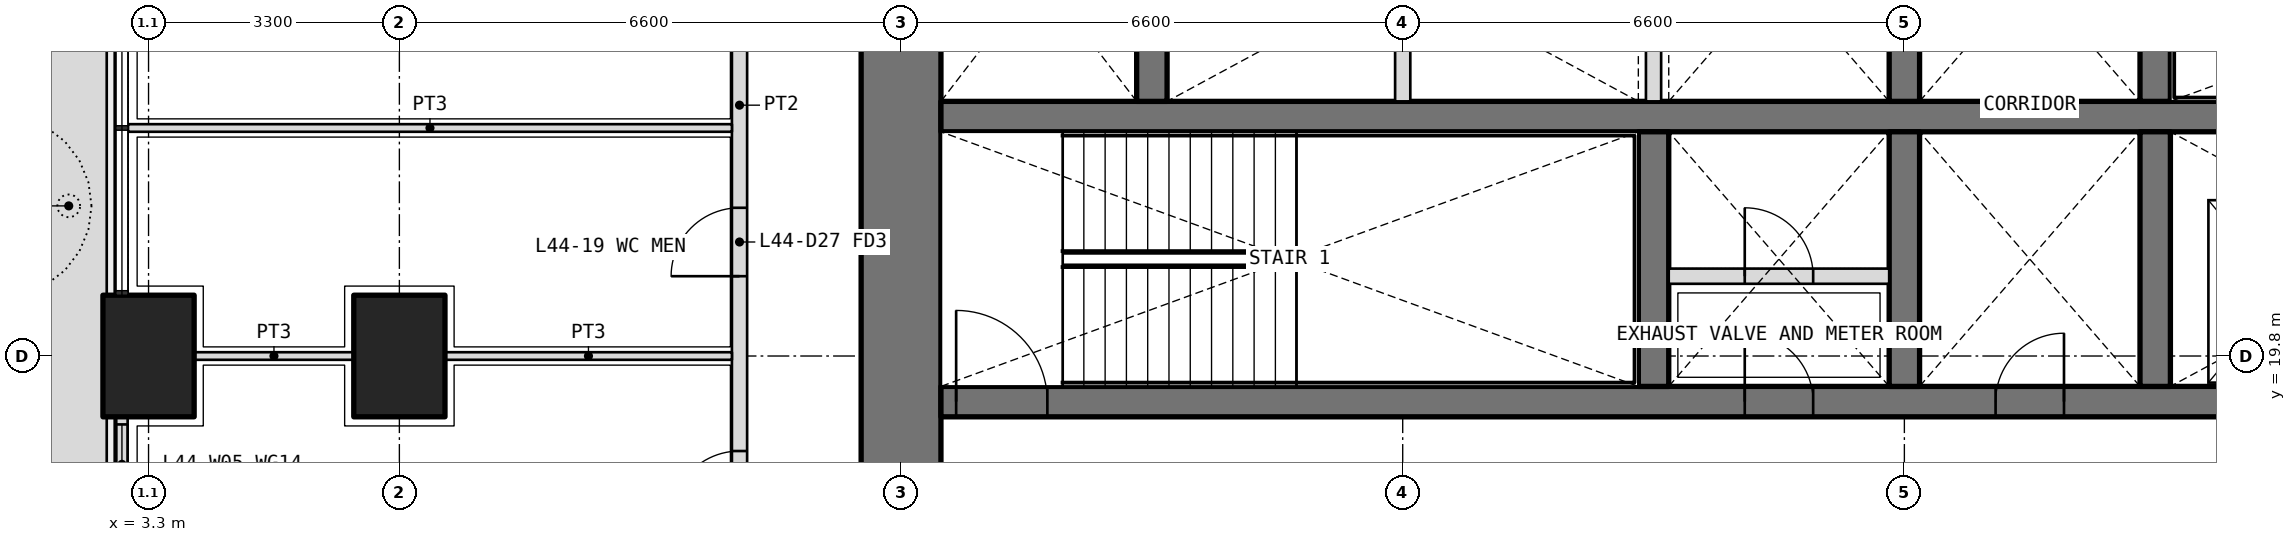
"""IFC4 building model, lengths in metres.
Left out: names, types, materials, properties, quantities, classifications, styles, units other than length and angle.
Written with IfcOpenShell. Run it as: python <this file> out.ifc"""

import sys

from ifc_helpers import new_model, si_unit, direction, frame, frame_2d, origin, origin_2d, place, context, subcontext, project, spatial, polyline, rectangle, outline, extrude, element, fill, save


model = new_model("IFC4")
c1 = context("Model", 3, precision=1e-05, world=origin(), true_north=direction((0.0, 1.0)))
c2 = subcontext(c1, "Body", "Model", "MODEL_VIEW")
j1 = project(units=[si_unit("LENGTHUNIT", "METRE"), si_unit("PLANEANGLEUNIT", "RADIAN")], contexts=[c1])
p1 = place(None, origin())
s1 = spatial("IfcSite", under=j1, at=p1, CompositionType="ELEMENT")
p2 = place(p1, origin())
s2 = spatial("IfcBuilding", under=s1, at=p2, CompositionType="ELEMENT")
p3 = place(p2, frame((0.0, 0.0, 193.5)))
s3 = spatial("IfcBuildingStorey", under=s2, at=p3, CompositionType="ELEMENT", Elevation=193.5)
for number, where, z_axis, x_axis in (
    (1, (3.3, 19.8, 0.0), (0.0, 0.0, 1.0), (0.0, 1.0, 0.0)),
    (2, (6.6, 19.8, 0.0), (0.0, 0.0, 1.0), (0.0, 1.0, 0.0)),
):
    element("IfcColumn", number, at=place(p3, frame(where, z_axis=z_axis, x_axis=x_axis)), inside=s3, PredefinedType="COLUMN", context=c2, shape_type="SweptSolid", body=[
        extrude(rectangle(XDim=1.6, YDim=1.2, at=origin_2d()), origin(), (0.0, 0.0, 1.0), 4.2),
    ])
p4 = place(p3, origin())
e3 = element("IfcWall", 3, at=p4, inside=s3, PredefinedType="USERDEFINED", context=c2, shape_type="SweptSolid", body=[
    extrude(outline(polyline([(1.75, 17.25), (2.75, 17.25), (2.75, 26.3), (1.75, 26.3), (1.75, 17.25)]), holes=[polyline([(1.9, 17.4), (2.6, 17.4), (2.6, 26.15), (1.9, 26.15), (1.9, 17.4)])]), origin(), (0.0, 0.0, 1.0), 1.05),
])
p5 = place(p3, frame((2.95, 19.0, 0.0), z_axis=(0.0, 0.0, 1.0), x_axis=(0.0, -1.0, 0.0)))
e4 = element("IfcWall", 4, at=p5, inside=s3, PredefinedType="SOLIDWALL", context=c2, shape_type="SweptSolid", body=[
    extrude(rectangle(XDim=5.0, YDim=0.15, at=frame_2d((2.5, 0.0))), origin(), (0.0, 0.0, 1.0), 2.7),
])
p6 = place(p5, frame((1.25, 0.0, 0.0)))
e5 = element("IfcOpeningElement", 5, at=p6, cuts=e4, PredefinedType="OPENING", context=c2, shape_type="SweptSolid", body=[
    extrude(rectangle(XDim=1.0, YDim=2.4, at=frame_2d((0.5, 1.2))), frame((0.0, 0.085, 0.0), z_axis=(0.0, -1.0, 0.0), x_axis=(1.0, 0.0, 0.0)), (0.0, 0.0, 1.0), 0.17),
])
p7 = place(p5, frame((0.1, 0.0, 0.1)))
e6 = element("IfcOpeningElement", 6, at=p7, cuts=e4, PredefinedType="OPENING", context=c2, shape_type="SweptSolid", body=[
    extrude(rectangle(XDim=1.05, YDim=2.3, at=frame_2d((0.525, 1.15))), frame((0.0, 0.085, 0.0), z_axis=(0.0, -1.0, 0.0), x_axis=(1.0, 0.0, 0.0)), (0.0, 0.0, 1.0), 0.17),
])
p8 = place(p5, frame((2.75, 0.0, 0.1)))
e7 = element("IfcOpeningElement", 7, at=p8, cuts=e4, PredefinedType="OPENING", context=c2, shape_type="SweptSolid", body=[
    extrude(rectangle(XDim=2.15, YDim=2.3, at=frame_2d((1.075, 1.15))), frame((0.0, 0.085, 0.0), z_axis=(0.0, -1.0, 0.0), x_axis=(1.0, 0.0, 0.0)), (0.0, 0.0, 1.0), 0.17),
])
p9 = place(p3, frame((13.2, 32.475, 0.0), z_axis=(0.0, 0.0, 1.0), x_axis=(0.0, -1.0, 0.0)))
e8 = element("IfcWall", 8, at=p9, inside=s3, PredefinedType="SHEAR", context=c2, shape_type="SweptSolid", body=[
    extrude(rectangle(XDim=18.75, YDim=1.05, at=frame_2d((9.375, 0.0))), origin(), (0.0, 0.0, 1.0), 4.2),
])
p10 = place(p9, frame((14.125, 0.0, 0.0)))
e9 = element("IfcOpeningElement", 9, at=p10, cuts=e8, PredefinedType="OPENING", context=c2, shape_type="SweptSolid", body=[
    extrude(rectangle(XDim=1.6, YDim=2.1, at=frame_2d((0.8, 1.05))), frame((0.0, 0.535, 0.0), z_axis=(0.0, -1.0, 0.0), x_axis=(1.0, 0.0, 0.0)), (0.0, 0.0, 1.0), 1.07),
])
p11 = place(p9, frame((3.325, 0.0, 0.0)))
e10 = element("IfcOpeningElement", 10, at=p11, cuts=e8, PredefinedType="OPENING", context=c2, shape_type="SweptSolid", body=[
    extrude(rectangle(XDim=1.6, YDim=2.1, at=frame_2d((0.8, 1.05))), frame((0.0, 0.535, 0.0), z_axis=(0.0, -1.0, 0.0), x_axis=(1.0, 0.0, 0.0)), (0.0, 0.0, 1.0), 1.07),
])
p12 = place(p3, frame((13.725, 19.2, 0.0), z_axis=(0.0, 0.0, 1.0), x_axis=(1.0, 0.0, 0.0)))
e11 = element("IfcWall", 11, at=p12, inside=s3, PredefinedType="SHEAR", context=c2, shape_type="SweptSolid", body=[
    extrude(rectangle(XDim=25.35, YDim=0.4, at=frame_2d((12.675, 0.0))), origin(), (0.0, 0.0, 1.0), 4.2),
])
p13 = place(p12, frame((10.575, 0.0, 0.0)))
e12 = element("IfcOpeningElement", 12, at=p13, cuts=e11, PredefinedType="OPENING", context=c2, shape_type="SweptSolid", body=[
    extrude(rectangle(XDim=0.9, YDim=2.1, at=frame_2d((0.45, 1.05))), frame((0.0, 0.21, 0.0), z_axis=(0.0, -1.0, 0.0), x_axis=(1.0, 0.0, 0.0)), (0.0, 0.0, 1.0), 0.42),
])
p14 = place(p12, frame((13.875, 0.0, 0.0)))
e13 = element("IfcOpeningElement", 13, at=p14, cuts=e11, PredefinedType="OPENING", context=c2, shape_type="SweptSolid", body=[
    extrude(rectangle(XDim=0.9, YDim=2.1, at=frame_2d((0.45, 1.05))), frame((0.0, 0.21, 0.0), z_axis=(0.0, -1.0, 0.0), x_axis=(1.0, 0.0, 0.0)), (0.0, 0.0, 1.0), 0.42),
])
p15 = place(p12, frame((0.2, 0.0, 0.0)))
e14 = element("IfcOpeningElement", 14, at=p15, cuts=e11, PredefinedType="OPENING", context=c2, shape_type="SweptSolid", body=[
    extrude(rectangle(XDim=1.2, YDim=2.1, at=frame_2d((0.6, 1.05))), frame((0.0, 0.21, 0.0), z_axis=(0.0, -1.0, 0.0), x_axis=(1.0, 0.0, 0.0)), (0.0, 0.0, 1.0), 0.42),
])
p16 = place(p12, frame((23.512, 0.0, 0.0)))
e15 = element("IfcOpeningElement", 15, at=p16, cuts=e11, PredefinedType="OPENING", context=c2, shape_type="SweptSolid", body=[
    extrude(rectangle(XDim=1.1, YDim=2.1, at=frame_2d((0.55, 1.05))), frame((0.0, 0.21, 0.0), z_axis=(0.0, -1.0, 0.0), x_axis=(1.0, 0.0, 0.0)), (0.0, 0.0, 1.0), 0.42),
])
p17 = place(p12, frame((17.125, 0.0, 0.0)))
e16 = element("IfcOpeningElement", 16, at=p17, cuts=e11, PredefinedType="OPENING", context=c2, shape_type="SweptSolid", body=[
    extrude(rectangle(XDim=1.1, YDim=2.1, at=frame_2d((0.55, 1.05))), frame((0.0, 0.21, 0.0), z_axis=(0.0, -1.0, 0.0), x_axis=(1.0, 0.0, 0.0)), (0.0, 0.0, 1.0), 0.42),
])
p18 = place(p12, frame((20.325, 0.0, 0.0)))
e17 = element("IfcOpeningElement", 17, at=p18, cuts=e11, PredefinedType="OPENING", context=c2, shape_type="SweptSolid", body=[
    extrude(rectangle(XDim=1.1, YDim=2.1, at=frame_2d((0.55, 1.05))), frame((0.0, 0.21, 0.0), z_axis=(0.0, -1.0, 0.0), x_axis=(1.0, 0.0, 0.0)), (0.0, 0.0, 1.0), 0.42),
])
p19 = place(p3, frame((13.725, 22.95, 0.0), z_axis=(0.0, 0.0, 1.0), x_axis=(1.0, 0.0, 0.0)))
e18 = element("IfcWall", 18, at=p19, inside=s3, PredefinedType="SHEAR", context=c2, shape_type="SweptSolid", body=[
    extrude(rectangle(XDim=25.35, YDim=0.4, at=frame_2d((12.675, 0.0))), origin(), (0.0, 0.0, 1.0), 4.2),
])
for number, where, z_axis, x_axis in (
    (19, (23.1, 19.4, 0.0), (0.0, 0.0, 1.0), (0.0, 1.0, 0.0)),
    (20, (26.4, 19.4, 0.0), (0.0, 0.0, 1.0), (0.0, 1.0, 0.0)),
    (21, (29.7, 19.4, 0.0), (0.0, 0.0, 1.0), (0.0, 1.0, 0.0)),
    (22, (16.5, 23.15, 0.0), (0.0, 0.0, 1.0), (0.0, 1.0, 0.0)),
    (23, (26.4, 23.15, 0.0), (0.0, 0.0, 1.0), (0.0, 1.0, 0.0)),
    (24, (29.7, 23.15, 0.0), (0.0, 0.0, 1.0), (0.0, 1.0, 0.0)),
):
    element("IfcWall", number, at=place(p3, frame(where, z_axis=z_axis, x_axis=x_axis)), inside=s3, PredefinedType="SHEAR", context=c2, shape_type="SweptSolid", body=[
        extrude(rectangle(XDim=3.35, YDim=0.4, at=frame_2d((1.675, 0.0))), origin(), (0.0, 0.0, 1.0), 4.2),
    ])
for number, where, z_axis, x_axis in (
    (25, (19.8, 23.15, 0.0), (0.0, 0.0, 1.0), (0.0, 1.0, 0.0)),
    (26, (23.1, 23.15, 0.0), (0.0, 0.0, 1.0), (0.0, 1.0, 0.0)),
):
    element("IfcWall", number, at=place(p3, frame(where, z_axis=z_axis, x_axis=x_axis)), inside=s3, PredefinedType="PARTITIONING", context=c2, shape_type="SweptSolid", body=[
        extrude(rectangle(XDim=3.35, YDim=0.2, at=frame_2d((1.675, 0.0))), origin(), (0.0, 0.0, 1.0), 4.2),
    ])
p20 = place(p3, frame((11.075, 11.175, 0.0), z_axis=(0.0, 0.0, 1.0), x_axis=(0.0, 1.0, 0.0)))
e27 = element("IfcWall", 27, at=p20, inside=s3, PredefinedType="PARTITIONING", context=c2, shape_type="SweptSolid", body=[
    extrude(rectangle(XDim=23.85, YDim=0.2, at=frame_2d((11.925, 0.0))), origin(), (0.0, 0.0, 1.0), 2.85),
])
p21 = place(p20, frame((0.462, 0.0, 0.0)))
e28 = element("IfcOpeningElement", 28, at=p21, cuts=e27, PredefinedType="OPENING", context=c2, shape_type="SweptSolid", body=[
    extrude(rectangle(XDim=1.0, YDim=2.1, at=frame_2d((0.5, 1.05))), frame((0.0, 0.11, 0.0), z_axis=(0.0, -1.0, 0.0), x_axis=(1.0, 0.0, 0.0)), (0.0, 0.0, 1.0), 0.22),
])
p22 = place(p20, frame((3.125, 0.0, 0.0)))
e29 = element("IfcOpeningElement", 29, at=p22, cuts=e27, PredefinedType="OPENING", context=c2, shape_type="SweptSolid", body=[
    extrude(rectangle(XDim=1.0, YDim=2.1, at=frame_2d((0.5, 1.05))), frame((0.0, 0.11, 0.0), z_axis=(0.0, -1.0, 0.0), x_axis=(1.0, 0.0, 0.0)), (0.0, 0.0, 1.0), 0.22),
])
p23 = place(p20, frame((6.475, 0.0, 0.0)))
e30 = element("IfcOpeningElement", 30, at=p23, cuts=e27, PredefinedType="OPENING", context=c2, shape_type="SweptSolid", body=[
    extrude(rectangle(XDim=0.9, YDim=2.1, at=frame_2d((0.45, 1.05))), frame((0.0, 0.11, 0.0), z_axis=(0.0, -1.0, 0.0), x_axis=(1.0, 0.0, 0.0)), (0.0, 0.0, 1.0), 0.22),
])
p24 = place(p20, frame((9.675, 0.0, 0.0)))
e31 = element("IfcOpeningElement", 31, at=p24, cuts=e27, PredefinedType="OPENING", context=c2, shape_type="SweptSolid", body=[
    extrude(rectangle(XDim=0.9, YDim=2.1, at=frame_2d((0.45, 1.05))), frame((0.0, 0.11, 0.0), z_axis=(0.0, -1.0, 0.0), x_axis=(1.0, 0.0, 0.0)), (0.0, 0.0, 1.0), 0.22),
])
p25 = place(p20, frame((12.925, 0.0, 0.0)))
e32 = element("IfcOpeningElement", 32, at=p25, cuts=e27, PredefinedType="OPENING", context=c2, shape_type="SweptSolid", body=[
    extrude(rectangle(XDim=1.0, YDim=2.1, at=frame_2d((0.5, 1.05))), frame((0.0, 0.11, 0.0), z_axis=(0.0, -1.0, 0.0), x_axis=(1.0, 0.0, 0.0)), (0.0, 0.0, 1.0), 0.22),
])
p26 = place(p20, frame((17.925, 0.0, 0.0)))
e33 = element("IfcOpeningElement", 33, at=p26, cuts=e27, PredefinedType="OPENING", context=c2, shape_type="SweptSolid", body=[
    extrude(rectangle(XDim=1.2, YDim=2.1, at=frame_2d((0.6, 1.05))), frame((0.0, 0.11, 0.0), z_axis=(0.0, -1.0, 0.0), x_axis=(1.0, 0.0, 0.0)), (0.0, 0.0, 1.0), 0.22),
])
p27 = place(p20, frame((22.288, 0.0, 0.0)))
e34 = element("IfcOpeningElement", 34, at=p27, cuts=e27, PredefinedType="OPENING", context=c2, shape_type="SweptSolid", body=[
    extrude(rectangle(XDim=1.2, YDim=2.1, at=frame_2d((0.6, 1.05))), frame((0.0, 0.11, 0.0), z_axis=(0.0, -1.0, 0.0), x_axis=(1.0, 0.0, 0.0)), (0.0, 0.0, 1.0), 0.22),
])
p28 = place(p3, frame((3.9, 19.8, 0.0), z_axis=(0.0, 0.0, 1.0), x_axis=(1.0, 0.0, 0.0)))
e35 = element("IfcWall", 35, at=p28, inside=s3, PredefinedType="PARTITIONING", context=c2, shape_type="SweptSolid", body=[
    extrude(rectangle(XDim=2.1, YDim=0.1, at=frame_2d((1.05, 0.0))), origin(), (0.0, 0.0, 1.0), 2.85),
])
p29 = place(p3, frame((7.2, 19.8, 0.0), z_axis=(0.0, 0.0, 1.0), x_axis=(1.0, 0.0, 0.0)))
e36 = element("IfcWall", 36, at=p29, inside=s3, PredefinedType="PARTITIONING", context=c2, shape_type="SweptSolid", body=[
    extrude(rectangle(XDim=3.775, YDim=0.1, at=frame_2d((1.888, 0.0))), origin(), (0.0, 0.0, 1.0), 2.85),
])
p30 = place(p3, frame((3.03, 22.8, 0.0), z_axis=(0.0, 0.0, 1.0), x_axis=(1.0, 0.0, 0.0)))
e37 = element("IfcWall", 37, at=p30, inside=s3, PredefinedType="PARTITIONING", context=c2, shape_type="SweptSolid", body=[
    extrude(rectangle(XDim=7.945, YDim=0.1, at=frame_2d((3.973, 0.0))), origin(), (0.0, 0.0, 1.0), 2.7),
])
p31 = place(p3, frame((23.3, 20.85, 0.0), z_axis=(0.0, 0.0, 1.0), x_axis=(1.0, 0.0, 0.0)))
e38 = element("IfcWall", 38, at=p31, inside=s3, PredefinedType="PARTITIONING", context=c2, shape_type="SweptSolid", body=[
    extrude(rectangle(XDim=2.9, YDim=0.2, at=frame_2d((1.45, 0.0))), origin(), (0.0, 0.0, 1.0), 3.9),
])
p32 = place(p31, frame((1.0, 0.0, 0.0)))
e39 = element("IfcOpeningElement", 39, at=p32, cuts=e38, PredefinedType="OPENING", context=c2, shape_type="SweptSolid", body=[
    extrude(rectangle(XDim=0.9, YDim=2.1, at=frame_2d((0.45, 1.05))), frame((0.0, 0.11, 0.0), z_axis=(0.0, -1.0, 0.0), x_axis=(1.0, 0.0, 0.0)), (0.0, 0.0, 1.0), 0.22),
])
p33 = place(p7, origin())
e40 = element("IfcWindow", 40, at=p33, inside=s3, PartitioningType="SINGLE_PANEL", PredefinedType="WINDOW", context=c2, shape_type="SweptSolid", body=[
    extrude(rectangle(XDim=1.05, YDim=2.3, at=frame_2d((0.525, 1.15))), frame((0.0, 0.03, 0.0), z_axis=(0.0, -1.0, 0.0), x_axis=(1.0, 0.0, 0.0)), (0.0, 0.0, 1.0), 0.06),
])
fill(e6, e40)
p34 = place(p23, origin())
e41 = element("IfcDoor", 41, at=p34, inside=s3, OperationType="SINGLE_SWING_LEFT", PredefinedType="DOOR", context=c2, shape_type="SweptSolid", body=[
    extrude(rectangle(XDim=0.9, YDim=2.1, at=frame_2d((0.45, 1.05))), frame((0.0, 0.025, 0.0), z_axis=(0.0, -1.0, 0.0), x_axis=(1.0, 0.0, 0.0)), (0.0, 0.0, 1.0), 0.05),
])
fill(e30, e41)
p35 = place(p24, origin())
e42 = element("IfcDoor", 42, at=p35, inside=s3, OperationType="SINGLE_SWING_LEFT", PredefinedType="DOOR", context=c2, shape_type="SweptSolid", body=[
    extrude(rectangle(XDim=0.9, YDim=2.1, at=frame_2d((0.45, 1.05))), frame((0.0, 0.025, 0.0), z_axis=(0.0, -1.0, 0.0), x_axis=(1.0, 0.0, 0.0)), (0.0, 0.0, 1.0), 0.05),
])
fill(e31, e42)
p36 = place(p13, origin())
e43 = element("IfcDoor", 43, at=p36, inside=s3, OperationType="SINGLE_SWING_LEFT", PredefinedType="DOOR", context=c2, shape_type="SweptSolid", body=[
    extrude(rectangle(XDim=0.9, YDim=2.1, at=frame_2d((0.45, 1.05))), frame((0.0, 0.025, 0.0), z_axis=(0.0, -1.0, 0.0), x_axis=(1.0, 0.0, 0.0)), (0.0, 0.0, 1.0), 0.05),
])
fill(e12, e43)
p37 = place(p32, origin())
e44 = element("IfcDoor", 44, at=p37, inside=s3, OperationType="SINGLE_SWING_LEFT", PredefinedType="DOOR", context=c2, shape_type="SweptSolid", body=[
    extrude(rectangle(XDim=0.9, YDim=2.1, at=frame_2d((0.45, 1.05))), frame((0.0, 0.025, 0.0), z_axis=(0.0, -1.0, 0.0), x_axis=(1.0, 0.0, 0.0)), (0.0, 0.0, 1.0), 0.05),
])
fill(e39, e44)
p38 = place(p14, origin())
e45 = element("IfcDoor", 45, at=p38, inside=s3, OperationType="SINGLE_SWING_RIGHT", PredefinedType="DOOR", context=c2, shape_type="SweptSolid", body=[
    extrude(rectangle(XDim=0.9, YDim=2.1, at=frame_2d((0.45, 1.05))), frame((0.0, 0.025, 0.0), z_axis=(0.0, -1.0, 0.0), x_axis=(1.0, 0.0, 0.0)), (0.0, 0.0, 1.0), 0.05),
])
fill(e13, e45)
p39 = place(p15, origin())
e46 = element("IfcDoor", 46, at=p39, inside=s3, OperationType="SINGLE_SWING_LEFT", PredefinedType="DOOR", context=c2, shape_type="SweptSolid", body=[
    extrude(rectangle(XDim=1.2, YDim=2.1, at=frame_2d((0.6, 1.05))), frame((0.0, 0.025, 0.0), z_axis=(0.0, -1.0, 0.0), x_axis=(1.0, 0.0, 0.0)), (0.0, 0.0, 1.0), 0.05),
])
fill(e14, e46)
save(model, sys.argv[1])
